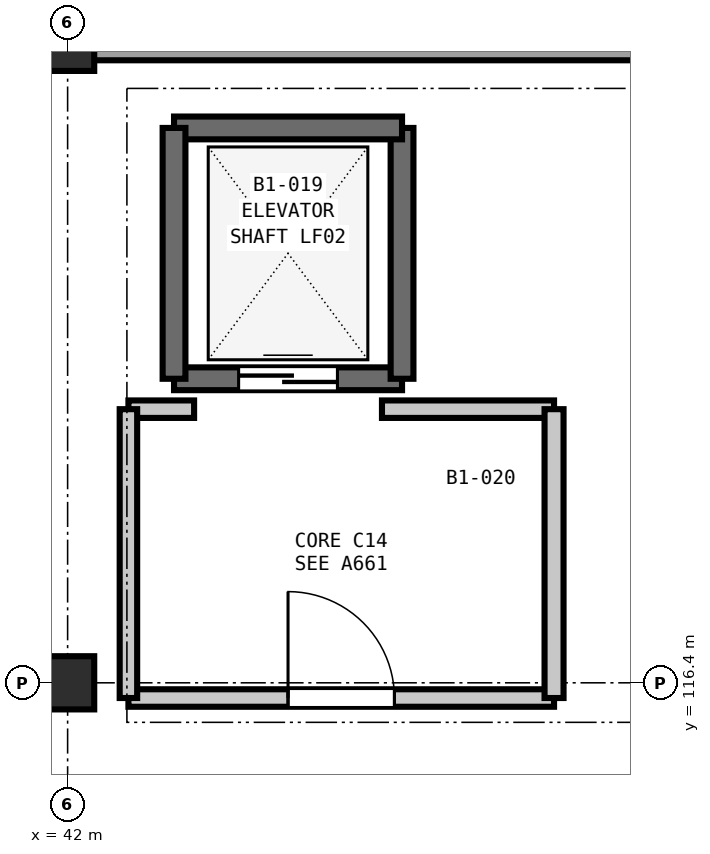
"""IFC4 building model, lengths in metres.
Left out: names, types, materials, properties, quantities, classifications, styles, units other than length and angle.
Written with IfcOpenShell. Run it as: python <this file> out.ifc"""

import sys

from ifc_helpers import new_model, si_unit, direction, frame, frame_2d, origin, origin_2d, place, context, subcontext, project, spatial, rectangle, extrude, element, fill, save


model = new_model("IFC4")
c1 = context("Model", 3, precision=1e-05, world=origin(), true_north=direction((0.0, 1.0)))
c2 = subcontext(c1, "Body", "Model", "MODEL_VIEW")
j1 = project(units=[si_unit("LENGTHUNIT", "METRE"), si_unit("PLANEANGLEUNIT", "RADIAN")], contexts=[c1])
p1 = place(None, origin())
s1 = spatial("IfcSite", under=j1, at=p1, CompositionType="ELEMENT")
p2 = place(p1, origin())
s2 = spatial("IfcBuilding", under=s1, at=p2, CompositionType="ELEMENT")
p3 = place(p2, frame((0.0, 0.0, -4.8)))
s3 = spatial("IfcBuildingStorey", under=s2, at=p3, CompositionType="ELEMENT", Elevation=-4.8)
for number, where, z_axis, x_axis in (
    (1, (42.0, 116.4, 0.0), (0.0, 0.0, 1.0), (1.0, 0.0, 0.0)),
    (2, (42.0, 124.8, 0.0), (0.0, 0.0, 1.0), (1.0, 0.0, 0.0)),
):
    element("IfcColumn", number, at=place(p3, frame(where, z_axis=z_axis, x_axis=x_axis)), inside=s3, PredefinedType="COLUMN", context=c2, shape_type="SweptSolid", body=[
        extrude(rectangle(XDim=0.7, YDim=0.7, at=origin_2d()), origin(), (0.0, 0.0, 1.0), 4.8),
    ])
for number, where, z_axis, x_axis in (
    (3, (33.6, 124.8, 0.0), (0.0, 0.0, 1.0), (1.0, 0.0, 0.0)),
    (4, (42.0, 124.8, 0.0), (0.0, 0.0, 1.0), (1.0, 0.0, 0.0)),
):
    element("IfcWall", number, at=place(p3, frame(where, z_axis=z_axis, x_axis=x_axis)), inside=s3, PredefinedType="SOLIDWALL", context=c2, shape_type="SweptSolid", body=[
        extrude(rectangle(XDim=8.4, YDim=0.42, at=frame_2d((4.2, 0.0))), origin(), (0.0, 0.0, 1.0), 4.05),
    ])
p4 = place(p3, frame((43.4, 120.4, 0.0), z_axis=(0.0, 0.0, 1.0), x_axis=(1.0, 0.0, 0.0)))
e5 = element("IfcWall", 5, at=p4, inside=s3, PredefinedType="SHEAR", context=c2, shape_type="SweptSolid", body=[
    extrude(rectangle(XDim=3.0, YDim=0.3, at=frame_2d((1.5, 0.0))), origin(), (0.0, 0.0, 1.0), 4.8),
])
p5 = place(p4, frame((0.85, 0.0, 0.0)))
e6 = element("IfcOpeningElement", 6, at=p5, cuts=e5, PredefinedType="OPENING", context=c2, shape_type="SweptSolid", body=[
    extrude(rectangle(XDim=1.3, YDim=2.2, at=frame_2d((0.65, 1.1))), frame((0.0, 0.16, 0.0), z_axis=(0.0, -1.0, 0.0), x_axis=(1.0, 0.0, 0.0)), (0.0, 0.0, 1.0), 0.32),
])
p6 = place(p3, frame((46.4, 120.4, 0.0), z_axis=(0.0, 0.0, 1.0), x_axis=(0.0, 1.0, 0.0)))
e7 = element("IfcWall", 7, at=p6, inside=s3, PredefinedType="SHEAR", context=c2, shape_type="SweptSolid", body=[
    extrude(rectangle(XDim=3.3, YDim=0.3, at=frame_2d((1.65, 0.0))), origin(), (0.0, 0.0, 1.0), 4.8),
])
p7 = place(p3, frame((46.4, 123.7, 0.0), z_axis=(0.0, 0.0, 1.0), x_axis=(-1.0, 0.0, 0.0)))
e8 = element("IfcWall", 8, at=p7, inside=s3, PredefinedType="SHEAR", context=c2, shape_type="SweptSolid", body=[
    extrude(rectangle(XDim=3.0, YDim=0.3, at=frame_2d((1.5, 0.0))), origin(), (0.0, 0.0, 1.0), 4.8),
])
p8 = place(p3, frame((43.4, 123.7, 0.0), z_axis=(0.0, 0.0, 1.0), x_axis=(0.0, -1.0, 0.0)))
e9 = element("IfcWall", 9, at=p8, inside=s3, PredefinedType="SHEAR", context=c2, shape_type="SweptSolid", body=[
    extrude(rectangle(XDim=3.3, YDim=0.3, at=frame_2d((1.65, 0.0))), origin(), (0.0, 0.0, 1.0), 4.8),
])
p9 = place(p3, frame((42.8, 116.2, 0.0), z_axis=(0.0, 0.0, 1.0), x_axis=(1.0, 0.0, 0.0)))
e10 = element("IfcWall", 10, at=p9, inside=s3, PredefinedType="PARTITIONING", context=c2, shape_type="SweptSolid", body=[
    extrude(rectangle(XDim=5.6, YDim=0.23, at=frame_2d((2.8, 0.0))), origin(), (0.0, 0.0, 1.0), 3.985),
])
p10 = place(p9, frame((2.1, 0.0, 0.0)))
e11 = element("IfcOpeningElement", 11, at=p10, cuts=e10, PredefinedType="OPENING", context=c2, shape_type="SweptSolid", body=[
    extrude(rectangle(XDim=1.4, YDim=2.2, at=frame_2d((0.7, 1.1))), frame((0.0, 0.125, 0.0), z_axis=(0.0, -1.0, 0.0), x_axis=(1.0, 0.0, 0.0)), (0.0, 0.0, 1.0), 0.25),
])
p11 = place(p3, frame((46.136, 120.0, 0.0), z_axis=(0.0, 0.0, 1.0), x_axis=(1.0, 0.0, 0.0)))
e12 = element("IfcWall", 12, at=p11, inside=s3, PredefinedType="PARTITIONING", context=c2, shape_type="SweptSolid", body=[
    extrude(rectangle(XDim=2.264, YDim=0.23, at=frame_2d((1.132, 0.0))), origin(), (0.0, 0.0, 1.0), 4.44),
])
p12 = place(p3, frame((42.8, 120.0, 0.0), z_axis=(0.0, 0.0, 1.0), x_axis=(1.0, 0.0, 0.0)))
e13 = element("IfcWall", 13, at=p12, inside=s3, PredefinedType="PARTITIONING", context=c2, shape_type="SweptSolid", body=[
    extrude(rectangle(XDim=0.864, YDim=0.23, at=frame_2d((0.432, 0.0))), origin(), (0.0, 0.0, 1.0), 4.44),
])
p13 = place(p3, frame((42.8, 116.2, 0.0), z_axis=(0.0, 0.0, 1.0), x_axis=(0.0, 1.0, 0.0)))
e14 = element("IfcWall", 14, at=p13, inside=s3, PredefinedType="PARTITIONING", context=c2, shape_type="SweptSolid", body=[
    extrude(rectangle(XDim=3.8, YDim=0.23, at=frame_2d((1.9, 0.0))), origin(), (0.0, 0.0, 1.0), 4.44),
])
p14 = place(p3, frame((48.4, 116.2, 0.0), z_axis=(0.0, 0.0, 1.0), x_axis=(0.0, 1.0, 0.0)))
e15 = element("IfcWall", 15, at=p14, inside=s3, PredefinedType="PARTITIONING", context=c2, shape_type="SweptSolid", body=[
    extrude(rectangle(XDim=3.8, YDim=0.25, at=frame_2d((1.9, 0.0))), origin(), (0.0, 0.0, 1.0), 4.44),
])
p15 = place(p5, origin())
e16 = element("IfcDoor", 16, at=p15, inside=s3, OperationType="DOUBLE_DOOR_SLIDING", PredefinedType="DOOR", context=c2, shape_type="SweptSolid", body=[
    extrude(rectangle(XDim=1.3, YDim=2.2, at=frame_2d((0.65, 1.1))), frame((0.0, 0.025, 0.0), z_axis=(0.0, -1.0, 0.0), x_axis=(1.0, 0.0, 0.0)), (0.0, 0.0, 1.0), 0.05),
])
fill(e6, e16)
p16 = place(p10, origin())
e17 = element("IfcDoor", 17, at=p16, inside=s3, OperationType="SINGLE_SWING_LEFT", PredefinedType="DOOR", context=c2, shape_type="SweptSolid", body=[
    extrude(rectangle(XDim=1.4, YDim=2.2, at=frame_2d((0.7, 1.1))), frame((0.0, 0.025, 0.0), z_axis=(0.0, -1.0, 0.0), x_axis=(1.0, 0.0, 0.0)), (0.0, 0.0, 1.0), 0.05),
])
fill(e11, e17)
save(model, sys.argv[1])
